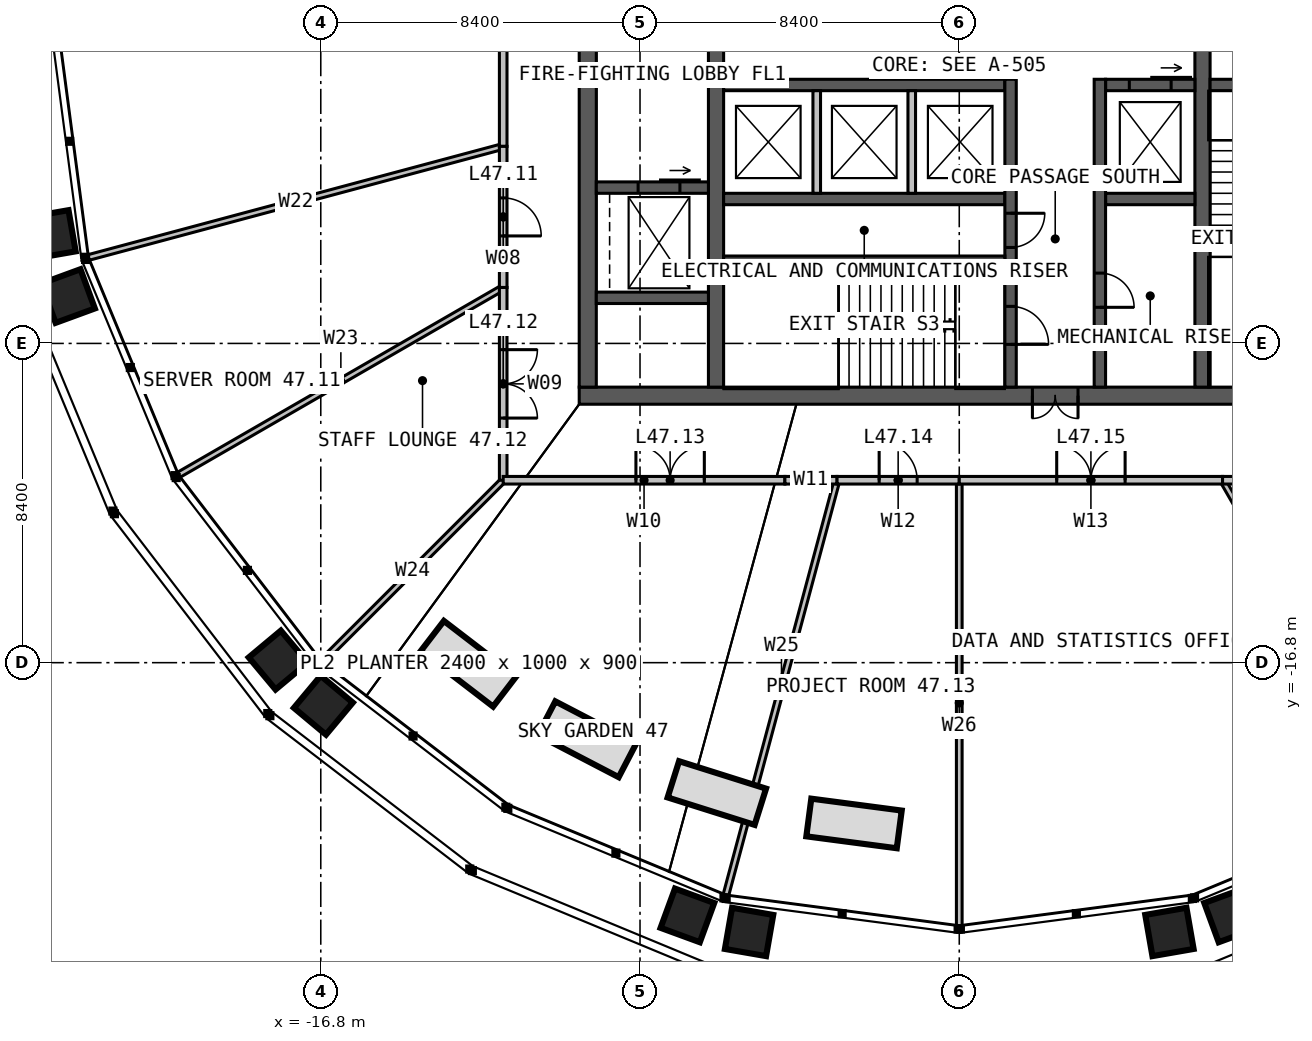
"""IFC4 building model, lengths in metres.
Left out: names, types, materials, properties, quantities, classifications, styles, units other than length and angle.
Written with IfcOpenShell. Run it as: python <this file> out.ifc"""

import sys

from ifc_helpers import new_model, si_unit, direction, frame, frame_2d, origin, place, context, subcontext, project, spatial, rectangle, extrude, element, fill, save


model = new_model("IFC4")
c1 = context("Model", 3, precision=1e-05, world=origin(), true_north=direction((0.0, 1.0)))
c2 = subcontext(c1, "Body", "Model", "MODEL_VIEW")
j1 = project(units=[si_unit("LENGTHUNIT", "METRE"), si_unit("PLANEANGLEUNIT", "RADIAN")], contexts=[c1])
p1 = place(None, origin())
s1 = spatial("IfcSite", under=j1, at=p1, CompositionType="ELEMENT")
p2 = place(p1, origin())
s2 = spatial("IfcBuilding", under=s1, at=p2, CompositionType="ELEMENT")
p3 = place(p2, frame((0.0, 0.0, 195.0)))
s3 = spatial("IfcBuildingStorey", under=s2, at=p3, CompositionType="ELEMENT", Elevation=195.0)
p4 = place(p3, frame((10.0, -9.775, 0.0), z_axis=(0.0, 0.0, 1.0), x_axis=(-1.0, 0.0, 0.0)))
e1 = element("IfcWall", 1, at=p4, inside=s3, PredefinedType="SOLIDWALL", context=c2, shape_type="SweptSolid", body=[
    extrude(rectangle(XDim=20.0, YDim=0.45, at=frame_2d((10.0, 0.0))), origin(), (0.0, 0.0, 1.0), 4.0),
])
p5 = place(p4, frame((6.875, 0.0, 0.0)))
e2 = element("IfcOpeningElement", 2, at=p5, cuts=e1, PredefinedType="OPENING", context=c2, shape_type="SweptSolid", body=[
    extrude(rectangle(XDim=1.2, YDim=2.2, at=frame_2d((0.6, 1.1))), frame((0.0, 0.235, 0.0), z_axis=(0.0, -1.0, 0.0), x_axis=(1.0, 0.0, 0.0)), (0.0, 0.0, 1.0), 0.47),
])
p6 = place(p3, frame((-9.775, 9.55, 0.0), z_axis=(0.0, 0.0, 1.0), x_axis=(0.0, -1.0, 0.0)))
e3 = element("IfcWall", 3, at=p6, inside=s3, PredefinedType="SOLIDWALL", context=c2, shape_type="SweptSolid", body=[
    extrude(rectangle(XDim=19.1, YDim=0.45, at=frame_2d((9.55, 0.0))), origin(), (0.0, 0.0, 1.0), 4.0),
])
p7 = place(p3, frame((-6.4, -9.55, 0.0), z_axis=(0.0, 0.0, 1.0), x_axis=(0.0, 1.0, 0.0)))
e4 = element("IfcWall", 4, at=p7, inside=s3, PredefinedType="SOLIDWALL", context=c2, shape_type="SweptSolid", body=[
    extrude(rectangle(XDim=19.1, YDim=0.4, at=frame_2d((9.55, 0.0))), origin(), (0.0, 0.0, 1.0), 4.0),
])
p8 = place(p7, frame((9.05, 0.0, 0.0)))
e5 = element("IfcOpeningElement", 5, at=p8, cuts=e4, PredefinedType="OPENING", context=c2, shape_type="SweptSolid", body=[
    extrude(rectangle(XDim=1.0, YDim=2.2, at=frame_2d((0.5, 1.1))), frame((0.0, 0.21, 0.0), z_axis=(0.0, -1.0, 0.0), x_axis=(1.0, 0.0, 0.0)), (0.0, 0.0, 1.0), 0.42),
])
p9 = place(p3, frame((6.4, 9.55, 0.0), z_axis=(0.0, 0.0, 1.0), x_axis=(0.0, -1.0, 0.0)))
e6 = element("IfcWall", 6, at=p9, inside=s3, PredefinedType="SOLIDWALL", context=c2, shape_type="SweptSolid", body=[
    extrude(rectangle(XDim=19.1, YDim=0.4, at=frame_2d((9.55, 0.0))), origin(), (0.0, 0.0, 1.0), 4.0),
])
p10 = place(p9, frame((9.05, 0.0, 0.0)))
e7 = element("IfcOpeningElement", 7, at=p10, cuts=e6, PredefinedType="OPENING", context=c2, shape_type="SweptSolid", body=[
    extrude(rectangle(XDim=1.0, YDim=2.2, at=frame_2d((0.5, 1.1))), frame((0.0, 0.21, 0.0), z_axis=(0.0, -1.0, 0.0), x_axis=(1.0, 0.0, 0.0)), (0.0, 0.0, 1.0), 0.42),
])
p11 = place(p3, frame((-6.2, -1.6, 0.0), z_axis=(0.0, 0.0, 1.0), x_axis=(1.0, 0.0, 0.0)))
e8 = element("IfcWall", 8, at=p11, inside=s3, PredefinedType="SOLIDWALL", context=c2, shape_type="SweptSolid", body=[
    extrude(rectangle(XDim=7.4, YDim=0.3, at=frame_2d((3.7, 0.0))), origin(), (0.0, 0.0, 1.0), 4.0),
])
p12 = place(p3, frame((3.85, -1.6, 0.0), z_axis=(0.0, 0.0, 1.0), x_axis=(1.0, 0.0, 0.0)))
e9 = element("IfcWall", 9, at=p12, inside=s3, PredefinedType="SOLIDWALL", context=c2, shape_type="SweptSolid", body=[
    extrude(rectangle(XDim=2.35, YDim=0.3, at=frame_2d((1.175, 0.0))), origin(), (0.0, 0.0, 1.0), 4.0),
])
p13 = place(p12, frame((0.625, 0.0, 0.0)))
e10 = element("IfcOpeningElement", 10, at=p13, cuts=e9, PredefinedType="OPENING", context=c2, shape_type="SweptSolid", body=[
    extrude(rectangle(XDim=1.1, YDim=2.2, at=frame_2d((0.55, 1.1))), frame((0.0, 0.16, 0.0), z_axis=(0.0, -1.0, 0.0), x_axis=(1.0, 0.0, 0.0)), (0.0, 0.0, 1.0), 0.32),
])
p14 = place(p3, frame((-6.2, -4.6, 0.0), z_axis=(0.0, 0.0, 1.0), x_axis=(1.0, 0.0, 0.0)))
e11 = element("IfcWall", 11, at=p14, inside=s3, PredefinedType="SOLIDWALL", context=c2, shape_type="SweptSolid", body=[
    extrude(rectangle(XDim=7.4, YDim=0.3, at=frame_2d((3.7, 0.0))), origin(), (0.0, 0.0, 1.0), 4.0),
])
p15 = place(p3, frame((3.85, -4.6, 0.0), z_axis=(0.0, 0.0, 1.0), x_axis=(1.0, 0.0, 0.0)))
e12 = element("IfcWall", 12, at=p15, inside=s3, PredefinedType="SOLIDWALL", context=c2, shape_type="SweptSolid", body=[
    extrude(rectangle(XDim=2.35, YDim=0.3, at=frame_2d((1.175, 0.0))), origin(), (0.0, 0.0, 1.0), 4.0),
])
p16 = place(p3, frame((1.35, -1.45, 0.0), z_axis=(0.0, 0.0, 1.0), x_axis=(0.0, -1.0, 0.0)))
e13 = element("IfcWall", 13, at=p16, inside=s3, PredefinedType="SOLIDWALL", context=c2, shape_type="SweptSolid", body=[
    extrude(rectangle(XDim=8.1, YDim=0.3, at=frame_2d((4.05, 0.0))), origin(), (0.0, 0.0, 1.0), 4.0),
])
p17 = place(p16, frame((5.975, 0.0, 0.0)))
e14 = element("IfcOpeningElement", 14, at=p17, cuts=e13, PredefinedType="OPENING", context=c2, shape_type="SweptSolid", body=[
    extrude(rectangle(XDim=1.0, YDim=2.2, at=frame_2d((0.5, 1.1))), frame((0.0, 0.16, 0.0), z_axis=(0.0, -1.0, 0.0), x_axis=(1.0, 0.0, 0.0)), (0.0, 0.0, 1.0), 0.32),
])
p18 = place(p16, frame((3.525, 0.0, 0.0)))
e15 = element("IfcOpeningElement", 15, at=p18, cuts=e13, PredefinedType="OPENING", context=c2, shape_type="SweptSolid", body=[
    extrude(rectangle(XDim=0.9, YDim=2.2, at=frame_2d((0.45, 1.1))), frame((0.0, 0.16, 0.0), z_axis=(0.0, -1.0, 0.0), x_axis=(1.0, 0.0, 0.0)), (0.0, 0.0, 1.0), 0.32),
])
p19 = place(p3, frame((3.7, -1.45, 0.0), z_axis=(0.0, 0.0, 1.0), x_axis=(0.0, -1.0, 0.0)))
e16 = element("IfcWall", 16, at=p19, inside=s3, PredefinedType="SOLIDWALL", context=c2, shape_type="SweptSolid", body=[
    extrude(rectangle(XDim=8.1, YDim=0.3, at=frame_2d((4.05, 0.0))), origin(), (0.0, 0.0, 1.0), 4.0),
])
p20 = place(p19, frame((5.1, 0.0, 0.0)))
e17 = element("IfcOpeningElement", 17, at=p20, cuts=e16, PredefinedType="OPENING", context=c2, shape_type="SweptSolid", body=[
    extrude(rectangle(XDim=0.9, YDim=2.2, at=frame_2d((0.45, 1.1))), frame((0.0, 0.16, 0.0), z_axis=(0.0, -1.0, 0.0), x_axis=(1.0, 0.0, 0.0)), (0.0, 0.0, 1.0), 0.32),
])
p21 = place(p3, frame((-6.2, -6.2, 0.0), z_axis=(0.0, 0.0, 1.0), x_axis=(1.0, 0.0, 0.0)))
e18 = element("IfcWall", 18, at=p21, inside=s3, PredefinedType="SOLIDWALL", context=c2, shape_type="SweptSolid", body=[
    extrude(rectangle(XDim=7.4, YDim=0.2, at=frame_2d((3.7, 0.0))), origin(), (0.0, 0.0, 1.0), 4.0),
])
p22 = place(p3, frame((6.6, -1.6, 0.0), z_axis=(0.0, 0.0, 1.0), x_axis=(1.0, 0.0, 0.0)))
e19 = element("IfcWall", 19, at=p22, inside=s3, PredefinedType="SOLIDWALL", context=c2, shape_type="SweptSolid", body=[
    extrude(rectangle(XDim=2.95, YDim=0.3, at=frame_2d((1.475, 0.0))), origin(), (0.0, 0.0, 1.0), 4.0),
])
p23 = place(p22, frame((0.975, 0.0, 0.0)))
e20 = element("IfcOpeningElement", 20, at=p23, cuts=e19, PredefinedType="OPENING", context=c2, shape_type="SweptSolid", body=[
    extrude(rectangle(XDim=1.0, YDim=2.2, at=frame_2d((0.5, 1.1))), frame((0.0, 0.16, 0.0), z_axis=(0.0, -1.0, 0.0), x_axis=(1.0, 0.0, 0.0)), (0.0, 0.0, 1.0), 0.32),
])
p24 = place(p3, frame((-9.55, -4.3, 0.0), z_axis=(0.0, 0.0, 1.0), x_axis=(1.0, 0.0, 0.0)))
e21 = element("IfcWall", 21, at=p24, inside=s3, PredefinedType="SOLIDWALL", context=c2, shape_type="SweptSolid", body=[
    extrude(rectangle(XDim=2.95, YDim=0.3, at=frame_2d((1.475, 0.0))), origin(), (0.0, 0.0, 1.0), 4.0),
])
p25 = place(p24, frame((1.1, 0.0, 0.0)))
e22 = element("IfcOpeningElement", 22, at=p25, cuts=e21, PredefinedType="OPENING", context=c2, shape_type="SweptSolid", body=[
    extrude(rectangle(XDim=1.1, YDim=2.2, at=frame_2d((0.55, 1.1))), frame((0.0, 0.16, 0.0), z_axis=(0.0, -1.0, 0.0), x_axis=(1.0, 0.0, 0.0)), (0.0, 0.0, 1.0), 0.32),
])
p26 = place(p3, frame((-9.55, -7.2, 0.0), z_axis=(0.0, 0.0, 1.0), x_axis=(1.0, 0.0, 0.0)))
e23 = element("IfcWall", 23, at=p26, inside=s3, PredefinedType="SOLIDWALL", context=c2, shape_type="SweptSolid", body=[
    extrude(rectangle(XDim=2.95, YDim=0.3, at=frame_2d((1.475, 0.0))), origin(), (0.0, 0.0, 1.0), 4.0),
])
for number, where, z_axis, x_axis in (
    (24, (-3.75, -1.75, 0.0), (0.0, 0.0, 1.0), (0.0, -1.0, 0.0)),
    (25, (-1.25, -1.75, 0.0), (0.0, 0.0, 1.0), (0.0, -1.0, 0.0)),
):
    element("IfcWall", number, at=place(p3, frame(where, z_axis=z_axis, x_axis=x_axis)), inside=s3, PredefinedType="SOLIDWALL", context=c2, shape_type="SweptSolid", body=[
        extrude(rectangle(XDim=2.7, YDim=0.2, at=frame_2d((1.35, 0.0))), origin(), (0.0, 0.0, 1.0), 3.75),
    ])
p27 = place(p3, frame((-12.0, -3.215, 0.0), z_axis=(0.0, 0.0, 1.0), x_axis=(-0.965926155577, -0.258817816178, 0.0)))
e26 = element("IfcWall", 26, at=p27, inside=s3, PredefinedType="PARTITIONING", context=c2, shape_type="SweptSolid", body=[
    extrude(rectangle(XDim=11.298, YDim=0.15, at=frame_2d((5.649, 0.0))), origin(), (0.0, 0.0, 1.0), 2.79),
])
p28 = place(p3, frame((-12.0, -6.928, 0.0), z_axis=(0.0, 0.0, 1.0), x_axis=(-0.866027739639, -0.49999595416, 0.0)))
e27 = element("IfcWall", 27, at=p28, inside=s3, PredefinedType="PARTITIONING", context=c2, shape_type="SweptSolid", body=[
    extrude(rectangle(XDim=9.865, YDim=0.15, at=frame_2d((4.932, 0.0))), origin(), (0.0, 0.0, 1.0), 2.79),
])
p29 = place(p3, frame((-12.0, -12.0, 0.0), z_axis=(0.0, 0.0, 1.0), x_axis=(-0.707106781187, -0.707106781187, 0.0)))
e28 = element("IfcWall", 28, at=p29, inside=s3, PredefinedType="PARTITIONING", context=c2, shape_type="SweptSolid", body=[
    extrude(rectangle(XDim=6.751, YDim=0.15, at=frame_2d((3.375, 0.0))), origin(), (0.0, 0.0, 1.0), 2.79),
])
p30 = place(p3, frame((-3.215, -12.0, 0.0), z_axis=(0.0, 0.0, 1.0), x_axis=(-0.258817816178, -0.965926155577, 0.0)))
e29 = element("IfcWall", 29, at=p30, inside=s3, PredefinedType="PARTITIONING", context=c2, shape_type="SweptSolid", body=[
    extrude(rectangle(XDim=11.298, YDim=0.15, at=frame_2d((5.649, 0.0))), origin(), (0.0, 0.0, 1.0), 2.79),
])
p31 = place(p3, frame((0.0, -12.0, 0.0), z_axis=(0.0, 0.0, 1.0), x_axis=(0.0, -1.0, 0.0)))
e30 = element("IfcWall", 30, at=p31, inside=s3, PredefinedType="PARTITIONING", context=c2, shape_type="SweptSolid", body=[
    extrude(rectangle(XDim=11.721, YDim=0.15, at=frame_2d((5.861, 0.0))), origin(), (0.0, 0.0, 1.0), 2.79),
])
p32 = place(p3, frame((6.928, -12.0, 0.0), z_axis=(0.0, 0.0, 1.0), x_axis=(0.49999595416, -0.866027739639, 0.0)))
e31 = element("IfcWall", 31, at=p32, inside=s3, PredefinedType="PARTITIONING", context=c2, shape_type="SweptSolid", body=[
    extrude(rectangle(XDim=9.865, YDim=0.15, at=frame_2d((4.932, 0.0))), origin(), (0.0, 0.0, 1.0), 2.79),
])
p33 = place(p3, frame((-12.0, 6.928, 0.0), z_axis=(0.0, 0.0, 1.0), x_axis=(0.0, -1.0, 0.0)))
e32 = element("IfcWall", 32, at=p33, inside=s3, PredefinedType="PARTITIONING", context=c2, shape_type="SweptSolid", body=[
    extrude(rectangle(XDim=10.144, YDim=0.2, at=frame_2d((5.072, 0.0))), origin(), (0.0, 0.0, 1.0), 3.8),
])
p34 = place(p33, frame((4.172, 0.0, 0.0)))
e33 = element("IfcOpeningElement", 33, at=p34, cuts=e32, PredefinedType="OPENING", context=c2, shape_type="SweptSolid", body=[
    extrude(rectangle(XDim=1.8, YDim=2.2, at=frame_2d((0.9, 1.1))), frame((0.0, 0.11, 0.0), z_axis=(0.0, -1.0, 0.0), x_axis=(1.0, 0.0, 0.0)), (0.0, 0.0, 1.0), 0.22),
])
p35 = place(p3, frame((-12.0, -3.215, 0.0), z_axis=(0.0, 0.0, 1.0), x_axis=(0.0, -1.0, 0.0)))
e34 = element("IfcWall", 34, at=p35, inside=s3, PredefinedType="PARTITIONING", context=c2, shape_type="SweptSolid", body=[
    extrude(rectangle(XDim=3.713, YDim=0.2, at=frame_2d((1.856, 0.0))), origin(), (0.0, 0.0, 1.0), 3.8),
])
p36 = place(p35, frame((1.356, 0.0, 0.0)))
e35 = element("IfcOpeningElement", 35, at=p36, cuts=e34, PredefinedType="OPENING", context=c2, shape_type="SweptSolid", body=[
    extrude(rectangle(XDim=1.0, YDim=2.2, at=frame_2d((0.5, 1.1))), frame((0.0, 0.11, 0.0), z_axis=(0.0, -1.0, 0.0), x_axis=(1.0, 0.0, 0.0)), (0.0, 0.0, 1.0), 0.22),
])
p37 = place(p3, frame((-12.0, -6.928, 0.0), z_axis=(0.0, 0.0, 1.0), x_axis=(0.0, -1.0, 0.0)))
e36 = element("IfcWall", 36, at=p37, inside=s3, PredefinedType="PARTITIONING", context=c2, shape_type="SweptSolid", body=[
    extrude(rectangle(XDim=5.072, YDim=0.2, at=frame_2d((2.536, 0.0))), origin(), (0.0, 0.0, 1.0), 3.8),
])
p38 = place(p37, frame((1.636, 0.0, 0.0)))
e37 = element("IfcOpeningElement", 37, at=p38, cuts=e36, PredefinedType="OPENING", context=c2, shape_type="SweptSolid", body=[
    extrude(rectangle(XDim=1.8, YDim=2.2, at=frame_2d((0.9, 1.1))), frame((0.0, 0.11, 0.0), z_axis=(0.0, -1.0, 0.0), x_axis=(1.0, 0.0, 0.0)), (0.0, 0.0, 1.0), 0.22),
])
p39 = place(p3, frame((-12.0, -12.0, 0.0), z_axis=(0.0, 0.0, 1.0), x_axis=(1.0, 0.0, 0.0)))
e38 = element("IfcWall", 38, at=p39, inside=s3, PredefinedType="PARTITIONING", context=c2, shape_type="SweptSolid", body=[
    extrude(rectangle(XDim=7.412, YDim=0.2, at=frame_2d((3.706, 0.0))), origin(), (0.0, 0.0, 1.0), 3.2),
])
p40 = place(p39, frame((3.492, 0.0, 0.0)))
e39 = element("IfcOpeningElement", 39, at=p40, cuts=e38, PredefinedType="OPENING", context=c2, shape_type="SweptSolid", body=[
    extrude(rectangle(XDim=1.8, YDim=2.2, at=frame_2d((0.9, 1.1))), frame((0.0, 0.11, 0.0), z_axis=(0.0, -1.0, 0.0), x_axis=(1.0, 0.0, 0.0)), (0.0, 0.0, 1.0), 0.22),
])
p41 = place(p3, frame((-4.588, -12.0, 0.0), z_axis=(0.0, 0.0, 1.0), x_axis=(1.0, 0.0, 0.0)))
e40 = element("IfcWall", 40, at=p41, inside=s3, PredefinedType="PARTITIONING", context=c2, shape_type="SweptSolid", body=[
    extrude(rectangle(XDim=1.373, YDim=0.2, at=frame_2d((0.686, 0.0))), origin(), (0.0, 0.0, 1.0), 3.8),
])
p42 = place(p3, frame((-3.215, -12.0, 0.0), z_axis=(0.0, 0.0, 1.0), x_axis=(1.0, 0.0, 0.0)))
e41 = element("IfcWall", 41, at=p42, inside=s3, PredefinedType="PARTITIONING", context=c2, shape_type="SweptSolid", body=[
    extrude(rectangle(XDim=3.215, YDim=0.2, at=frame_2d((1.608, 0.0))), origin(), (0.0, 0.0, 1.0), 3.8),
])
p43 = place(p42, frame((1.108, 0.0, 0.0)))
e42 = element("IfcOpeningElement", 42, at=p43, cuts=e41, PredefinedType="OPENING", context=c2, shape_type="SweptSolid", body=[
    extrude(rectangle(XDim=1.0, YDim=2.2, at=frame_2d((0.5, 1.1))), frame((0.0, 0.11, 0.0), z_axis=(0.0, -1.0, 0.0), x_axis=(1.0, 0.0, 0.0)), (0.0, 0.0, 1.0), 0.22),
])
p44 = place(p3, frame((0.0, -12.0, 0.0), z_axis=(0.0, 0.0, 1.0), x_axis=(1.0, 0.0, 0.0)))
e43 = element("IfcWall", 43, at=p44, inside=s3, PredefinedType="PARTITIONING", context=c2, shape_type="SweptSolid", body=[
    extrude(rectangle(XDim=6.928, YDim=0.2, at=frame_2d((3.464, 0.0))), origin(), (0.0, 0.0, 1.0), 3.8),
])
p45 = place(p44, frame((2.564, 0.0, 0.0)))
e44 = element("IfcOpeningElement", 44, at=p45, cuts=e43, PredefinedType="OPENING", context=c2, shape_type="SweptSolid", body=[
    extrude(rectangle(XDim=1.8, YDim=2.2, at=frame_2d((0.9, 1.1))), frame((0.0, 0.11, 0.0), z_axis=(0.0, -1.0, 0.0), x_axis=(1.0, 0.0, 0.0)), (0.0, 0.0, 1.0), 0.22),
])
p46 = place(p3, frame((6.928, -12.0, 0.0), z_axis=(0.0, 0.0, 1.0), x_axis=(1.0, 0.0, 0.0)))
e45 = element("IfcWall", 45, at=p46, inside=s3, PredefinedType="PARTITIONING", context=c2, shape_type="SweptSolid", body=[
    extrude(rectangle(XDim=5.072, YDim=0.2, at=frame_2d((2.536, 0.0))), origin(), (0.0, 0.0, 1.0), 3.8),
])
p47 = place(p5, origin())
e46 = element("IfcDoor", 46, at=p47, inside=s3, OperationType="DOUBLE_DOOR_SINGLE_SWING", PredefinedType="DOOR", context=c2, shape_type="SweptSolid", body=[
    extrude(rectangle(XDim=1.2, YDim=2.2, at=frame_2d((0.6, 1.1))), frame((0.0, 0.025, 0.0), z_axis=(0.0, -1.0, 0.0), x_axis=(1.0, 0.0, 0.0)), (0.0, 0.0, 1.0), 0.05),
])
fill(e2, e46)
p48 = place(p17, origin())
e47 = element("IfcDoor", 47, at=p48, inside=s3, OperationType="SINGLE_SWING_RIGHT", PredefinedType="DOOR", context=c2, shape_type="SweptSolid", body=[
    extrude(rectangle(XDim=1.0, YDim=2.2, at=frame_2d((0.5, 1.1))), frame((0.0, 0.025, 0.0), z_axis=(0.0, -1.0, 0.0), x_axis=(1.0, 0.0, 0.0)), (0.0, 0.0, 1.0), 0.05),
])
fill(e14, e47)
p49 = place(p18, origin())
e48 = element("IfcDoor", 48, at=p49, inside=s3, OperationType="SINGLE_SWING_LEFT", PredefinedType="DOOR", context=c2, shape_type="SweptSolid", body=[
    extrude(rectangle(XDim=0.9, YDim=2.2, at=frame_2d((0.45, 1.1))), frame((0.0, 0.025, 0.0), z_axis=(0.0, -1.0, 0.0), x_axis=(1.0, 0.0, 0.0)), (0.0, 0.0, 1.0), 0.05),
])
fill(e15, e48)
p50 = place(p20, origin())
e49 = element("IfcDoor", 49, at=p50, inside=s3, OperationType="SINGLE_SWING_RIGHT", PredefinedType="DOOR", context=c2, shape_type="SweptSolid", body=[
    extrude(rectangle(XDim=0.9, YDim=2.2, at=frame_2d((0.45, 1.1))), frame((0.0, 0.025, 0.0), z_axis=(0.0, -1.0, 0.0), x_axis=(1.0, 0.0, 0.0)), (0.0, 0.0, 1.0), 0.05),
])
fill(e17, e49)
p51 = place(p13, origin())
e50 = element("IfcDoor", 50, at=p51, inside=s3, OperationType="SLIDING_TO_LEFT", PredefinedType="DOOR", context=c2, shape_type="SweptSolid", body=[
    extrude(rectangle(XDim=1.1, YDim=2.2, at=frame_2d((0.55, 1.1))), frame((0.0, 0.025, 0.0), z_axis=(0.0, -1.0, 0.0), x_axis=(1.0, 0.0, 0.0)), (0.0, 0.0, 1.0), 0.05),
])
fill(e10, e50)
p52 = place(p25, origin())
e51 = element("IfcDoor", 51, at=p52, inside=s3, OperationType="SLIDING_TO_LEFT", PredefinedType="DOOR", context=c2, shape_type="SweptSolid", body=[
    extrude(rectangle(XDim=1.1, YDim=2.2, at=frame_2d((0.55, 1.1))), frame((0.0, 0.025, 0.0), z_axis=(0.0, -1.0, 0.0), x_axis=(1.0, 0.0, 0.0)), (0.0, 0.0, 1.0), 0.05),
])
fill(e22, e51)
p53 = place(p36, origin())
e52 = element("IfcDoor", 52, at=p53, inside=s3, OperationType="SINGLE_SWING_RIGHT", PredefinedType="DOOR", context=c2, shape_type="SweptSolid", body=[
    extrude(rectangle(XDim=1.0, YDim=2.2, at=frame_2d((0.5, 1.1))), frame((0.0, 0.025, 0.0), z_axis=(0.0, -1.0, 0.0), x_axis=(1.0, 0.0, 0.0)), (0.0, 0.0, 1.0), 0.05),
])
fill(e35, e52)
p54 = place(p38, origin())
e53 = element("IfcDoor", 53, at=p54, inside=s3, OperationType="DOUBLE_DOOR_SINGLE_SWING", PredefinedType="DOOR", context=c2, shape_type="SweptSolid", body=[
    extrude(rectangle(XDim=1.8, YDim=2.2, at=frame_2d((0.9, 1.1))), frame((0.0, 0.025, 0.0), z_axis=(0.0, -1.0, 0.0), x_axis=(1.0, 0.0, 0.0)), (0.0, 0.0, 1.0), 0.05),
])
fill(e37, e53)
p55 = place(p40, origin())
e54 = element("IfcDoor", 54, at=p55, inside=s3, OperationType="DOUBLE_DOOR_SINGLE_SWING", PredefinedType="DOOR", context=c2, shape_type="SweptSolid", body=[
    extrude(rectangle(XDim=1.8, YDim=2.2, at=frame_2d((0.9, 1.1))), frame((0.0, 0.025, 0.0), z_axis=(0.0, -1.0, 0.0), x_axis=(1.0, 0.0, 0.0)), (0.0, 0.0, 1.0), 0.05),
])
fill(e39, e54)
p56 = place(p43, origin())
e55 = element("IfcDoor", 55, at=p56, inside=s3, OperationType="SINGLE_SWING_LEFT", PredefinedType="DOOR", context=c2, shape_type="SweptSolid", body=[
    extrude(rectangle(XDim=1.0, YDim=2.2, at=frame_2d((0.5, 1.1))), frame((0.0, 0.025, 0.0), z_axis=(0.0, -1.0, 0.0), x_axis=(1.0, 0.0, 0.0)), (0.0, 0.0, 1.0), 0.05),
])
fill(e42, e55)
p57 = place(p45, origin())
e56 = element("IfcDoor", 56, at=p57, inside=s3, OperationType="DOUBLE_DOOR_SINGLE_SWING", PredefinedType="DOOR", context=c2, shape_type="SweptSolid", body=[
    extrude(rectangle(XDim=1.8, YDim=2.2, at=frame_2d((0.9, 1.1))), frame((0.0, 0.025, 0.0), z_axis=(0.0, -1.0, 0.0), x_axis=(1.0, 0.0, 0.0)), (0.0, 0.0, 1.0), 0.05),
])
fill(e44, e56)
save(model, sys.argv[1])
